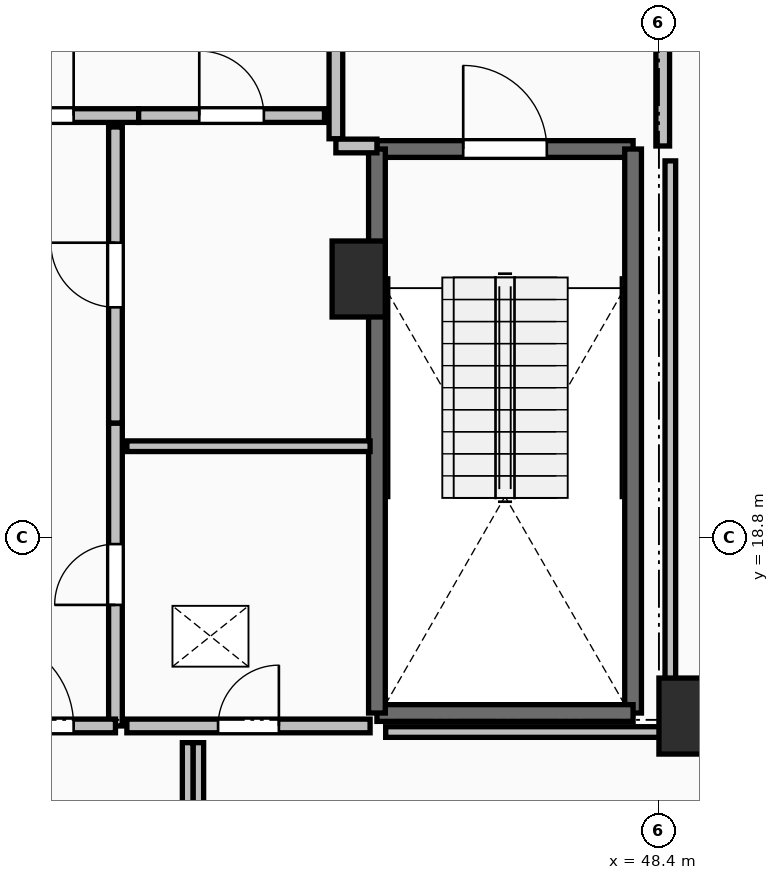
"""IFC4 building model, lengths in metres.
Left out: names, types, materials, properties, quantities, classifications, styles, units other than length and angle.
Written with IfcOpenShell. Run it as: python <this file> out.ifc"""

import sys

from ifc_helpers import new_model, si_unit, direction, frame, frame_2d, origin, origin_2d, place, context, subcontext, project, spatial, rectangle, extrude, element, fill, save


model = new_model("IFC4")
c1 = context("Model", 3, precision=1e-05, world=origin(), true_north=direction((0.0, 1.0)))
c2 = subcontext(c1, "Body", "Model", "MODEL_VIEW")
j1 = project(units=[si_unit("LENGTHUNIT", "METRE"), si_unit("PLANEANGLEUNIT", "RADIAN")], contexts=[c1])
p1 = place(None, origin())
s1 = spatial("IfcSite", under=j1, at=p1, CompositionType="ELEMENT")
p2 = place(p1, origin())
s2 = spatial("IfcBuilding", under=s1, at=p2, CompositionType="ELEMENT")
p3 = place(p2, frame((0.0, 0.0, 266.2)))
s3 = spatial("IfcBuildingStorey", under=s2, at=p3, CompositionType="ELEMENT", Elevation=266.2)
for number, where, z_axis, x_axis in (
    (1, (48.75, 16.45, 0.0), (0.0, 0.0, 1.0), (1.0, 0.0, 0.0)),
    (2, (44.45, 22.2, 0.0), (0.0, 0.0, 1.0), (1.0, 0.0, 0.0)),
):
    element("IfcColumn", number, at=place(p3, frame(where, z_axis=z_axis, x_axis=x_axis)), inside=s3, PredefinedType="PILASTER", context=c2, shape_type="SweptSolid", body=[
        extrude(rectangle(XDim=0.7, YDim=1.0, at=origin_2d()), origin(), (0.0, 0.0, 1.0), 3.55),
    ])
p4 = place(p3, frame((44.69, 23.91, 0.0), z_axis=(0.0, 0.0, 1.0), x_axis=(1.0, 0.0, 0.0)))
e3 = element("IfcWall", 3, at=p4, inside=s3, PredefinedType="SOLIDWALL", context=c2, shape_type="SweptSolid", body=[
    extrude(rectangle(XDim=3.37, YDim=0.22, at=frame_2d((1.685, 0.0))), origin(), (0.0, 0.0, 1.0), 3.29),
])
p5 = place(p4, frame((1.135, 0.0, 0.0)))
e4 = element("IfcOpeningElement", 4, at=p5, cuts=e3, PredefinedType="OPENING", context=c2, shape_type="SweptSolid", body=[
    extrude(rectangle(XDim=1.1, YDim=2.15, at=frame_2d((0.55, 1.075))), frame((0.0, 0.125, 0.0), z_axis=(0.0, -1.0, 0.0), x_axis=(1.0, 0.0, 0.0)), (0.0, 0.0, 1.0), 0.25),
])
p6 = place(p3, frame((48.06, 23.91, 0.0), z_axis=(0.0, 0.0, 1.0), x_axis=(0.0, -1.0, 0.0)))
e5 = element("IfcWall", 5, at=p6, inside=s3, PredefinedType="SOLIDWALL", context=c2, shape_type="SweptSolid", body=[
    extrude(rectangle(XDim=7.42, YDim=0.22, at=frame_2d((3.71, 0.0))), origin(), (0.0, 0.0, 1.0), 3.29),
])
p7 = place(p3, frame((48.06, 16.49, 0.0), z_axis=(0.0, 0.0, 1.0), x_axis=(-1.0, 0.0, 0.0)))
e6 = element("IfcWall", 6, at=p7, inside=s3, PredefinedType="SOLIDWALL", context=c2, shape_type="SweptSolid", body=[
    extrude(rectangle(XDim=3.37, YDim=0.22, at=frame_2d((1.685, 0.0))), origin(), (0.0, 0.0, 1.0), 3.29),
])
p8 = place(p3, frame((44.69, 16.49, 0.0), z_axis=(0.0, 0.0, 1.0), x_axis=(0.0, 1.0, 0.0)))
e7 = element("IfcWall", 7, at=p8, inside=s3, PredefinedType="SOLIDWALL", context=c2, shape_type="SweptSolid", body=[
    extrude(rectangle(XDim=7.42, YDim=0.22, at=frame_2d((3.71, 0.0))), origin(), (0.0, 0.0, 1.0), 3.29),
])
p9 = place(p3, frame((44.15, 27.955, 0.0), z_axis=(0.0, 0.0, 1.0), x_axis=(0.0, -1.0, 0.0)))
e8 = element("IfcWall", 8, at=p9, inside=s3, PredefinedType="PARTITIONING", context=c2, shape_type="SweptSolid", body=[
    extrude(rectangle(XDim=3.91, YDim=0.18, at=frame_2d((1.955, 0.0))), origin(), (0.0, 0.0, 1.0), 3.29),
])
p10 = place(p9, frame((1.355, 0.0, 0.0)))
e9 = element("IfcOpeningElement", 9, at=p10, cuts=e8, PredefinedType="OPENING", context=c2, shape_type="SweptSolid", body=[
    extrude(rectangle(XDim=1.2, YDim=2.15, at=frame_2d((0.6, 1.075))), frame((0.0, 0.105, 0.0), z_axis=(0.0, -1.0, 0.0), x_axis=(1.0, 0.0, 0.0)), (0.0, 0.0, 1.0), 0.21),
])
p11 = place(p3, frame((44.15, 23.95, 0.0), z_axis=(0.0, 0.0, 1.0), x_axis=(1.0, 0.0, 0.0)))
e10 = element("IfcWall", 10, at=p11, inside=s3, PredefinedType="PARTITIONING", context=c2, shape_type="SweptSolid", body=[
    extrude(rectangle(XDim=0.54, YDim=0.18, at=frame_2d((0.27, 0.0))), origin(), (0.0, 0.0, 1.0), 3.29),
])
p12 = place(p3, frame((48.45, 23.95, 0.0), z_axis=(0.0, 0.0, 1.0), x_axis=(0.0, 1.0, 0.0)))
e11 = element("IfcWall", 11, at=p12, inside=s3, PredefinedType="PARTITIONING", context=c2, shape_type="SweptSolid", body=[
    extrude(rectangle(XDim=4.05, YDim=0.18, at=frame_2d((2.025, 0.0))), origin(), (0.0, 0.0, 1.0), 3.29),
])
p13 = place(p12, frame((1.425, 0.0, 0.0)))
e12 = element("IfcOpeningElement", 12, at=p13, cuts=e11, PredefinedType="OPENING", context=c2, shape_type="SweptSolid", body=[
    extrude(rectangle(XDim=1.2, YDim=2.15, at=frame_2d((0.6, 1.075))), frame((0.0, 0.105, 0.0), z_axis=(0.0, -1.0, 0.0), x_axis=(1.0, 0.0, 0.0)), (0.0, 0.0, 1.0), 0.21),
])
p14 = place(p3, frame((38.645, 24.35, 0.0), z_axis=(0.0, 0.0, 1.0), x_axis=(1.0, 0.0, 0.0)))
e13 = element("IfcWall", 13, at=p14, inside=s3, PredefinedType="PARTITIONING", context=c2, shape_type="SweptSolid", body=[
    extrude(rectangle(XDim=2.91, YDim=0.18, at=frame_2d((1.455, 0.0))), origin(), (0.0, 0.0, 1.0), 3.29),
])
p15 = place(p14, frame((0.855, 0.0, 0.0)))
e14 = element("IfcOpeningElement", 14, at=p15, cuts=e13, PredefinedType="OPENING", context=c2, shape_type="SweptSolid", body=[
    extrude(rectangle(XDim=1.2, YDim=2.15, at=frame_2d((0.6, 1.075))), frame((0.0, 0.105, 0.0), z_axis=(0.0, -1.0, 0.0), x_axis=(1.0, 0.0, 0.0)), (0.0, 0.0, 1.0), 0.21),
])
p16 = place(p3, frame((41.555, 24.35, 0.0), z_axis=(0.0, 0.0, 1.0), x_axis=(1.0, 0.0, 0.0)))
e15 = element("IfcWall", 15, at=p16, inside=s3, PredefinedType="PARTITIONING", context=c2, shape_type="SweptSolid", body=[
    extrude(rectangle(XDim=2.445, YDim=0.18, at=frame_2d((1.223, 0.0))), origin(), (0.0, 0.0, 1.0), 3.29),
])
p17 = place(p16, frame((0.798, 0.0, 0.0)))
e16 = element("IfcOpeningElement", 16, at=p17, cuts=e15, PredefinedType="OPENING", context=c2, shape_type="SweptSolid", body=[
    extrude(rectangle(XDim=0.85, YDim=2.1, at=frame_2d((0.425, 1.05))), frame((0.0, 0.105, 0.0), z_axis=(0.0, -1.0, 0.0), x_axis=(1.0, 0.0, 0.0)), (0.0, 0.0, 1.0), 0.21),
])
p18 = place(p3, frame((41.25, 16.32, 0.0), z_axis=(0.0, 0.0, 1.0), x_axis=(0.0, 1.0, 0.0)))
e17 = element("IfcWall", 17, at=p18, inside=s3, PredefinedType="PARTITIONING", context=c2, shape_type="SweptSolid", body=[
    extrude(rectangle(XDim=3.985, YDim=0.18, at=frame_2d((1.992, 0.0))), origin(), (0.0, 0.0, 1.0), 3.29),
])
p19 = place(p18, frame((1.593, 0.0, 0.0)))
e18 = element("IfcOpeningElement", 18, at=p19, cuts=e17, PredefinedType="OPENING", context=c2, shape_type="SweptSolid", body=[
    extrude(rectangle(XDim=0.8, YDim=2.05, at=frame_2d((0.4, 1.025))), frame((0.0, 0.105, 0.0), z_axis=(0.0, -1.0, 0.0), x_axis=(1.0, 0.0, 0.0)), (0.0, 0.0, 1.0), 0.21),
])
p20 = place(p3, frame((41.25, 20.305, 0.0), z_axis=(0.0, 0.0, 1.0), x_axis=(0.0, 1.0, 0.0)))
e19 = element("IfcWall", 19, at=p20, inside=s3, PredefinedType="PARTITIONING", context=c2, shape_type="SweptSolid", body=[
    extrude(rectangle(XDim=3.895, YDim=0.18, at=frame_2d((1.948, 0.0))), origin(), (0.0, 0.0, 1.0), 2.482),
])
p21 = place(p20, frame((1.522, 0.0, 0.0)))
e20 = element("IfcOpeningElement", 20, at=p21, cuts=e19, PredefinedType="OPENING", context=c2, shape_type="SweptSolid", body=[
    extrude(rectangle(XDim=0.85, YDim=2.1, at=frame_2d((0.425, 1.05))), frame((0.0, 0.105, 0.0), z_axis=(0.0, -1.0, 0.0), x_axis=(1.0, 0.0, 0.0)), (0.0, 0.0, 1.0), 0.21),
])
p22 = place(p3, frame((38.95, 16.32, 0.0), z_axis=(0.0, 0.0, 1.0), x_axis=(1.0, 0.0, 0.0)))
e21 = element("IfcWall", 21, at=p22, inside=s3, PredefinedType="PARTITIONING", context=c2, shape_type="SweptSolid", body=[
    extrude(rectangle(XDim=2.3, YDim=0.18, at=frame_2d((1.15, 0.0))), origin(), (0.0, 0.0, 1.0), 3.29),
])
p23 = place(p22, frame((0.55, 0.0, 0.0)))
e22 = element("IfcOpeningElement", 22, at=p23, cuts=e21, PredefinedType="OPENING", context=c2, shape_type="SweptSolid", body=[
    extrude(rectangle(XDim=1.2, YDim=2.15, at=frame_2d((0.6, 1.075))), frame((0.0, 0.105, 0.0), z_axis=(0.0, -1.0, 0.0), x_axis=(1.0, 0.0, 0.0)), (0.0, 0.0, 1.0), 0.21),
])
p24 = place(p3, frame((44.6, 20.0, 0.0), z_axis=(0.0, 0.0, 1.0), x_axis=(-1.0, 0.0, 0.0)))
e23 = element("IfcWall", 23, at=p24, inside=s3, PredefinedType="PARTITIONING", context=c2, shape_type="SweptSolid", body=[
    extrude(rectangle(XDim=3.2, YDim=0.14, at=frame_2d((1.6, 0.0))), origin(), (0.0, 0.0, 1.0), 3.29),
])
p25 = place(p3, frame((41.4, 16.32, 0.0), z_axis=(0.0, 0.0, 1.0), x_axis=(1.0, 0.0, 0.0)))
e24 = element("IfcWall", 24, at=p25, inside=s3, PredefinedType="PARTITIONING", context=c2, shape_type="SweptSolid", body=[
    extrude(rectangle(XDim=3.2, YDim=0.18, at=frame_2d((1.6, 0.0))), origin(), (0.0, 0.0, 1.0), 3.29),
])
p26 = place(p25, frame((1.2, 0.0, 0.0)))
e25 = element("IfcOpeningElement", 25, at=p26, cuts=e24, PredefinedType="OPENING", context=c2, shape_type="SweptSolid", body=[
    extrude(rectangle(XDim=0.8, YDim=2.05, at=frame_2d((0.4, 1.025))), frame((0.0, 0.105, 0.0), z_axis=(0.0, -1.0, 0.0), x_axis=(1.0, 0.0, 0.0)), (0.0, 0.0, 1.0), 0.21),
])
p27 = place(p3, frame((42.34, 14.27, 0.0), z_axis=(0.0, 0.0, 1.0), x_axis=(0.0, 1.0, 0.0)))
e26 = element("IfcWall", 26, at=p27, inside=s3, PredefinedType="PARTITIONING", context=c2, shape_type="SweptSolid", body=[
    extrude(rectangle(XDim=1.83, YDim=0.14, at=frame_2d((0.915, 0.0))), origin(), (0.0, 0.0, 1.0), 3.29),
])
p28 = place(p3, frame((44.805, 16.24, 0.0), z_axis=(0.0, 0.0, 1.0), x_axis=(1.0, 0.0, 0.0)))
e27 = element("IfcWall", 27, at=p28, inside=s3, PredefinedType="PARTITIONING", context=c2, shape_type="SweptSolid", body=[
    extrude(rectangle(XDim=3.745, YDim=0.14, at=frame_2d((1.873, 0.0))), origin(), (0.0, 0.0, 1.0), 2.482),
])
p29 = place(p3, frame((48.55, 16.24, 0.0), z_axis=(0.0, 0.0, 1.0), x_axis=(0.0, 1.0, 0.0)))
e28 = element("IfcWall", 28, at=p29, inside=s3, PredefinedType="PARTITIONING", context=c2, shape_type="SweptSolid", body=[
    extrude(rectangle(XDim=7.514, YDim=0.14, at=frame_2d((3.757, 0.0))), origin(), (0.0, 0.0, 1.0), 2.482),
])
p30 = place(p3, frame((42.2, 16.1, 0.0), z_axis=(0.0, 0.0, 1.0), x_axis=(0.0, -1.0, 0.0)))
e29 = element("IfcWall", 29, at=p30, inside=s3, PredefinedType="PARTITIONING", context=c2, shape_type="SweptSolid", body=[
    extrude(rectangle(XDim=1.83, YDim=0.14, at=frame_2d((0.915, 0.0))), origin(), (0.0, 0.0, 1.0), 3.29),
])
p31 = place(p5, origin())
e30 = element("IfcDoor", 30, at=p31, inside=s3, OperationType="SINGLE_SWING_LEFT", PredefinedType="DOOR", context=c2, shape_type="SweptSolid", body=[
    extrude(rectangle(XDim=1.1, YDim=2.15, at=frame_2d((0.55, 1.075))), frame((0.0, 0.025, 0.0), z_axis=(0.0, -1.0, 0.0), x_axis=(1.0, 0.0, 0.0)), (0.0, 0.0, 1.0), 0.05),
])
fill(e4, e30)
p32 = place(p15, origin())
e31 = element("IfcDoor", 31, at=p32, inside=s3, OperationType="SINGLE_SWING_RIGHT", PredefinedType="DOOR", context=c2, shape_type="SweptSolid", body=[
    extrude(rectangle(XDim=1.2, YDim=2.15, at=frame_2d((0.6, 1.075))), frame((0.0, 0.025, 0.0), z_axis=(0.0, -1.0, 0.0), x_axis=(1.0, 0.0, 0.0)), (0.0, 0.0, 1.0), 0.05),
])
fill(e14, e31)
p33 = place(p17, origin())
e32 = element("IfcDoor", 32, at=p33, inside=s3, OperationType="SINGLE_SWING_LEFT", PredefinedType="DOOR", context=c2, shape_type="SweptSolid", body=[
    extrude(rectangle(XDim=0.85, YDim=2.1, at=frame_2d((0.425, 1.05))), frame((0.0, 0.025, 0.0), z_axis=(0.0, -1.0, 0.0), x_axis=(1.0, 0.0, 0.0)), (0.0, 0.0, 1.0), 0.05),
])
fill(e16, e32)
p34 = place(p19, origin())
e33 = element("IfcDoor", 33, at=p34, inside=s3, OperationType="SINGLE_SWING_LEFT", PredefinedType="DOOR", context=c2, shape_type="SweptSolid", body=[
    extrude(rectangle(XDim=0.8, YDim=2.05, at=frame_2d((0.4, 1.025))), frame((0.0, 0.025, 0.0), z_axis=(0.0, -1.0, 0.0), x_axis=(1.0, 0.0, 0.0)), (0.0, 0.0, 1.0), 0.05),
])
fill(e18, e33)
p35 = place(p21, origin())
e34 = element("IfcDoor", 34, at=p35, inside=s3, OperationType="SINGLE_SWING_RIGHT", PredefinedType="DOOR", context=c2, shape_type="SweptSolid", body=[
    extrude(rectangle(XDim=0.85, YDim=2.1, at=frame_2d((0.425, 1.05))), frame((0.0, 0.025, 0.0), z_axis=(0.0, -1.0, 0.0), x_axis=(1.0, 0.0, 0.0)), (0.0, 0.0, 1.0), 0.05),
])
fill(e20, e34)
p36 = place(p23, origin())
e35 = element("IfcDoor", 35, at=p36, inside=s3, OperationType="SINGLE_SWING_LEFT", PredefinedType="DOOR", context=c2, shape_type="SweptSolid", body=[
    extrude(rectangle(XDim=1.2, YDim=2.15, at=frame_2d((0.6, 1.075))), frame((0.0, 0.025, 0.0), z_axis=(0.0, -1.0, 0.0), x_axis=(1.0, 0.0, 0.0)), (0.0, 0.0, 1.0), 0.05),
])
fill(e22, e35)
p37 = place(p26, origin())
e36 = element("IfcDoor", 36, at=p37, inside=s3, OperationType="SINGLE_SWING_RIGHT", PredefinedType="DOOR", context=c2, shape_type="SweptSolid", body=[
    extrude(rectangle(XDim=0.8, YDim=2.05, at=frame_2d((0.4, 1.025))), frame((0.0, 0.025, 0.0), z_axis=(0.0, -1.0, 0.0), x_axis=(1.0, 0.0, 0.0)), (0.0, 0.0, 1.0), 0.05),
])
fill(e25, e36)
save(model, sys.argv[1])
